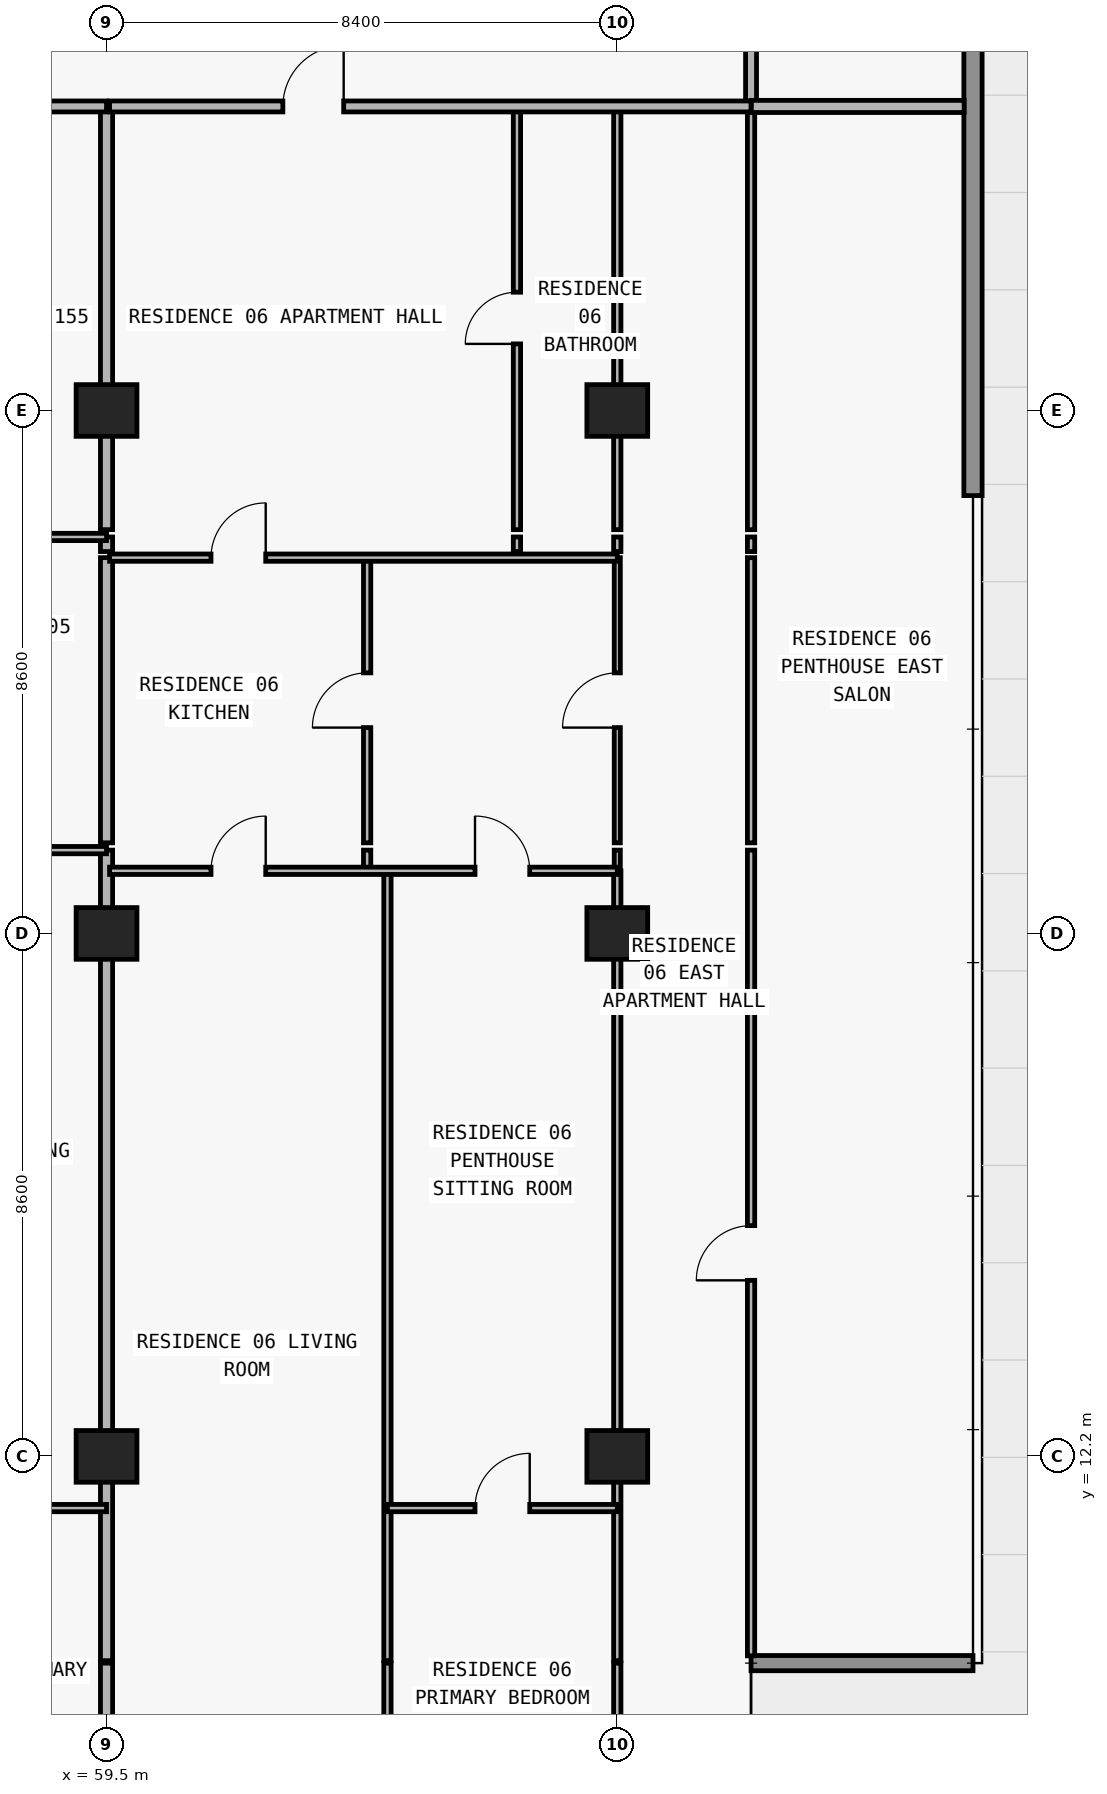
"""IFC4 building model, lengths in metres.
Left out: names, types, materials, properties, quantities, classifications, styles, units other than length and angle.
Written with IfcOpenShell. Run it as: python <this file> out.ifc"""

import sys

from ifc_helpers import new_model, si_unit, direction, frame, frame_2d, origin, origin_2d, place, context, subcontext, project, spatial, rectangle, extrude, element, fill, save


model = new_model("IFC4")
c1 = context("Model", 3, precision=1e-05, world=origin(), true_north=direction((0.0, 1.0)))
c2 = subcontext(c1, "Body", "Model", "MODEL_VIEW")
j1 = project(units=[si_unit("LENGTHUNIT", "METRE"), si_unit("PLANEANGLEUNIT", "RADIAN")], contexts=[c1])
p1 = place(None, origin())
s1 = spatial("IfcSite", under=j1, at=p1, CompositionType="ELEMENT")
p2 = place(p1, origin())
s2 = spatial("IfcBuilding", under=s1, at=p2, CompositionType="ELEMENT")
p3 = place(p2, frame((0.0, 0.0, 84.6)))
s3 = spatial("IfcBuildingStorey", under=s2, at=p3, CompositionType="ELEMENT", Elevation=84.6)
for number, where, z_axis, x_axis in (
    (1, (59.5, 12.2, 0.0), (0.0, 0.0, 1.0), (1.0, 0.0, 0.0)),
    (2, (67.9, 12.2, 0.0), (0.0, 0.0, 1.0), (1.0, 0.0, 0.0)),
    (3, (59.5, 20.8, 0.0), (0.0, 0.0, 1.0), (1.0, 0.0, 0.0)),
    (4, (67.9, 20.8, 0.0), (0.0, 0.0, 1.0), (1.0, 0.0, 0.0)),
    (5, (59.5, 29.4, 0.0), (0.0, 0.0, 1.0), (1.0, 0.0, 0.0)),
    (6, (67.9, 29.4, 0.0), (0.0, 0.0, 1.0), (1.0, 0.0, 0.0)),
):
    element("IfcColumn", number, at=place(p3, frame(where, z_axis=z_axis, x_axis=x_axis)), inside=s3, PredefinedType="COLUMN", context=c2, shape_type="SweptSolid", body=[
        extrude(rectangle(XDim=1.0, YDim=0.85, at=origin_2d()), origin(), (0.0, 0.0, 1.0), 3.05),
    ])
p4 = place(p3, frame((70.1, 8.8, 0.0), z_axis=(0.0, 0.0, 1.0), x_axis=(1.0, 0.0, 0.0)))
e7 = element("IfcWall", 7, at=p4, inside=s3, PredefinedType="ELEMENTEDWALL", context=c2, shape_type="SweptSolid", body=[
    extrude(rectangle(XDim=3.65, YDim=0.25, at=frame_2d((1.825, 0.0))), origin(), (0.0, 0.0, 1.0), 3.05),
])
p5 = place(p3, frame((73.75, 47.2, 0.0), z_axis=(0.0, 0.0, 1.0), x_axis=(0.0, -1.0, 0.0)))
e8 = element("IfcWall", 8, at=p5, inside=s3, PredefinedType="STANDARD", context=c2, shape_type="SweptSolid", body=[
    extrude(rectangle(XDim=19.2, YDim=0.3, at=frame_2d((9.6, 0.0))), origin(), (0.0, 0.0, 1.0), 3.05),
])
p6 = place(p3, frame((59.5, 5.695, 0.0), z_axis=(0.0, 0.0, 1.0), x_axis=(0.0, 1.0, 0.0)))
e9 = element("IfcWall", 9, at=p6, inside=s3, PredefinedType="PARTITIONING", context=c2, shape_type="SweptSolid", body=[
    extrude(rectangle(XDim=3.105, YDim=0.2, at=frame_2d((1.552, 0.0))), origin(), (0.0, 0.0, 1.0), 3.05),
])
p7 = place(p3, frame((59.5, 8.84, 0.0), z_axis=(0.0, 0.0, 1.0), x_axis=(0.0, 1.0, 0.0)))
e10 = element("IfcWall", 10, at=p7, inside=s3, PredefinedType="PARTITIONING", context=c2, shape_type="SweptSolid", body=[
    extrude(rectangle(XDim=13.33, YDim=0.2, at=frame_2d((6.665, 0.0))), origin(), (0.0, 0.0, 1.0), 2.174),
])
p8 = place(p3, frame((59.5, 22.29, 0.0), z_axis=(0.0, 0.0, 1.0), x_axis=(0.0, 1.0, 0.0)))
e11 = element("IfcWall", 11, at=p8, inside=s3, PredefinedType="PARTITIONING", context=c2, shape_type="SweptSolid", body=[
    extrude(rectangle(XDim=4.69, YDim=0.2, at=frame_2d((2.345, 0.0))), origin(), (0.0, 0.0, 1.0), 2.174),
])
p9 = place(p3, frame((59.5, 27.08, 0.0), z_axis=(0.0, 0.0, 1.0), x_axis=(0.0, 1.0, 0.0)))
e12 = element("IfcWall", 12, at=p9, inside=s3, PredefinedType="PARTITIONING", context=c2, shape_type="SweptSolid", body=[
    extrude(rectangle(XDim=0.24, YDim=0.2, at=frame_2d((0.12, 0.0))), origin(), (0.0, 0.0, 1.0), 2.174),
])
p10 = place(p3, frame((59.5, 27.44, 0.0), z_axis=(0.0, 0.0, 1.0), x_axis=(0.0, 1.0, 0.0)))
e13 = element("IfcWall", 13, at=p10, inside=s3, PredefinedType="PARTITIONING", context=c2, shape_type="SweptSolid", body=[
    extrude(rectangle(XDim=6.96, YDim=0.2, at=frame_2d((3.48, 0.0))), origin(), (0.0, 0.0, 1.0), 2.174),
])
p11 = place(p3, frame((63.786, 21.83, 0.0), z_axis=(0.0, 0.0, 1.0), x_axis=(0.0, 1.0, 0.0)))
e14 = element("IfcWall", 14, at=p11, inside=s3, PredefinedType="PARTITIONING", context=c2, shape_type="SweptSolid", body=[
    extrude(rectangle(XDim=0.34, YDim=0.12, at=frame_2d((0.17, 0.0))), origin(), (0.0, 0.0, 1.0), 3.05),
])
p12 = place(p3, frame((63.786, 22.29, 0.0), z_axis=(0.0, 0.0, 1.0), x_axis=(0.0, 1.0, 0.0)))
e15 = element("IfcWall", 15, at=p12, inside=s3, PredefinedType="PARTITIONING", context=c2, shape_type="SweptSolid", body=[
    extrude(rectangle(XDim=4.69, YDim=0.12, at=frame_2d((2.345, 0.0))), origin(), (0.0, 0.0, 1.0), 3.05),
])
p13 = place(p12, frame((1.895, 0.0, 0.0)))
e16 = element("IfcOpeningElement", 16, at=p13, cuts=e15, PredefinedType="OPENING", context=c2, shape_type="SweptSolid", body=[
    extrude(rectangle(XDim=0.9, YDim=2.15, at=frame_2d((0.45, 1.075))), frame((0.0, 0.07, 0.0), z_axis=(0.0, -1.0, 0.0), x_axis=(1.0, 0.0, 0.0)), (0.0, 0.0, 1.0), 0.14),
])
p14 = place(p3, frame((64.12, 5.695, 0.0), z_axis=(0.0, 0.0, 1.0), x_axis=(0.0, 1.0, 0.0)))
e17 = element("IfcWall", 17, at=p14, inside=s3, PredefinedType="PARTITIONING", context=c2, shape_type="SweptSolid", body=[
    extrude(rectangle(XDim=3.105, YDim=0.12, at=frame_2d((1.552, 0.0))), origin(), (0.0, 0.0, 1.0), 3.05),
])
p15 = place(p3, frame((64.12, 8.84, 0.0), z_axis=(0.0, 0.0, 1.0), x_axis=(0.0, 1.0, 0.0)))
e18 = element("IfcWall", 18, at=p15, inside=s3, PredefinedType="PARTITIONING", context=c2, shape_type="SweptSolid", body=[
    extrude(rectangle(XDim=12.99, YDim=0.12, at=frame_2d((6.495, 0.0))), origin(), (0.0, 0.0, 1.0), 3.05),
])
p16 = place(p3, frame((66.25, 27.08, 0.0), z_axis=(0.0, 0.0, 1.0), x_axis=(0.0, 1.0, 0.0)))
e19 = element("IfcWall", 19, at=p16, inside=s3, PredefinedType="PARTITIONING", context=c2, shape_type="SweptSolid", body=[
    extrude(rectangle(XDim=0.24, YDim=0.12, at=frame_2d((0.12, 0.0))), origin(), (0.0, 0.0, 1.0), 3.05),
])
p17 = place(p3, frame((66.25, 27.44, 0.0), z_axis=(0.0, 0.0, 1.0), x_axis=(0.0, 1.0, 0.0)))
e20 = element("IfcWall", 20, at=p17, inside=s3, PredefinedType="PARTITIONING", context=c2, shape_type="SweptSolid", body=[
    extrude(rectangle(XDim=6.96, YDim=0.12, at=frame_2d((3.48, 0.0))), origin(), (0.0, 0.0, 1.0), 3.05),
])
p18 = place(p17, frame((3.055, 0.0, 0.0)))
e21 = element("IfcOpeningElement", 21, at=p18, cuts=e20, PredefinedType="OPENING", context=c2, shape_type="SweptSolid", body=[
    extrude(rectangle(XDim=0.85, YDim=2.1, at=frame_2d((0.425, 1.05))), frame((0.0, 0.07, 0.0), z_axis=(0.0, -1.0, 0.0), x_axis=(1.0, 0.0, 0.0)), (0.0, 0.0, 1.0), 0.14),
])
p19 = place(p3, frame((67.9, 5.695, 0.0), z_axis=(0.0, 0.0, 1.0), x_axis=(0.0, 1.0, 0.0)))
e22 = element("IfcWall", 22, at=p19, inside=s3, PredefinedType="PARTITIONING", context=c2, shape_type="SweptSolid", body=[
    extrude(rectangle(XDim=3.105, YDim=0.12, at=frame_2d((1.552, 0.0))), origin(), (0.0, 0.0, 1.0), 3.05),
])
p20 = place(p3, frame((67.9, 8.84, 0.0), z_axis=(0.0, 0.0, 1.0), x_axis=(0.0, 1.0, 0.0)))
e23 = element("IfcWall", 23, at=p20, inside=s3, PredefinedType="PARTITIONING", context=c2, shape_type="SweptSolid", body=[
    extrude(rectangle(XDim=12.99, YDim=0.12, at=frame_2d((6.495, 0.0))), origin(), (0.0, 0.0, 1.0), 2.174),
])
p21 = place(p3, frame((67.9, 21.835, 0.0), z_axis=(0.0, 0.0, 1.0), x_axis=(0.0, 1.0, 0.0)))
e24 = element("IfcWall", 24, at=p21, inside=s3, PredefinedType="MOVABLE", context=c2, shape_type="SweptSolid", body=[
    extrude(rectangle(XDim=0.335, YDim=0.1, at=frame_2d((0.167, 0.0))), origin(), (0.0, 0.0, 1.0), 2.174),
])
p22 = place(p3, frame((67.9, 22.29, 0.0), z_axis=(0.0, 0.0, 1.0), x_axis=(0.0, 1.0, 0.0)))
e25 = element("IfcWall", 25, at=p22, inside=s3, PredefinedType="MOVABLE", context=c2, shape_type="SweptSolid", body=[
    extrude(rectangle(XDim=4.69, YDim=0.1, at=frame_2d((2.345, 0.0))), origin(), (0.0, 0.0, 1.0), 2.174),
])
p23 = place(p22, frame((1.895, 0.0, 0.0)))
e26 = element("IfcOpeningElement", 26, at=p23, cuts=e25, PredefinedType="OPENING", context=c2, shape_type="SweptSolid", body=[
    extrude(rectangle(XDim=0.9, YDim=2.124, at=frame_2d((0.45, 1.062))), frame((0.0, 0.06, 0.0), z_axis=(0.0, -1.0, 0.0), x_axis=(1.0, 0.0, 0.0)), (0.0, 0.0, 1.0), 0.12),
])
p24 = place(p3, frame((67.9, 27.08, 0.0), z_axis=(0.0, 0.0, 1.0), x_axis=(0.0, 1.0, 0.0)))
e27 = element("IfcWall", 27, at=p24, inside=s3, PredefinedType="PARTITIONING", context=c2, shape_type="SweptSolid", body=[
    extrude(rectangle(XDim=0.24, YDim=0.12, at=frame_2d((0.12, 0.0))), origin(), (0.0, 0.0, 1.0), 2.174),
])
p25 = place(p3, frame((67.9, 27.44, 0.0), z_axis=(0.0, 0.0, 1.0), x_axis=(0.0, 1.0, 0.0)))
e28 = element("IfcWall", 28, at=p25, inside=s3, PredefinedType="PARTITIONING", context=c2, shape_type="SweptSolid", body=[
    extrude(rectangle(XDim=6.96, YDim=0.12, at=frame_2d((3.48, 0.0))), origin(), (0.0, 0.0, 1.0), 2.174),
])
p26 = place(p3, frame((70.1, 8.92, 0.0), z_axis=(0.0, 0.0, 1.0), x_axis=(0.0, 1.0, 0.0)))
e29 = element("IfcWall", 29, at=p26, inside=s3, PredefinedType="PARTITIONING", context=c2, shape_type="SweptSolid", body=[
    extrude(rectangle(XDim=13.25, YDim=0.12, at=frame_2d((6.625, 0.0))), origin(), (0.0, 0.0, 1.0), 3.05),
])
p27 = place(p26, frame((6.175, 0.0, 0.0)))
e30 = element("IfcOpeningElement", 30, at=p27, cuts=e29, PredefinedType="OPENING", context=c2, shape_type="SweptSolid", body=[
    extrude(rectangle(XDim=0.9, YDim=2.15, at=frame_2d((0.45, 1.075))), frame((0.0, 0.07, 0.0), z_axis=(0.0, -1.0, 0.0), x_axis=(1.0, 0.0, 0.0)), (0.0, 0.0, 1.0), 0.14),
])
p28 = place(p3, frame((70.1, 22.29, 0.0), z_axis=(0.0, 0.0, 1.0), x_axis=(0.0, 1.0, 0.0)))
e31 = element("IfcWall", 31, at=p28, inside=s3, PredefinedType="PARTITIONING", context=c2, shape_type="SweptSolid", body=[
    extrude(rectangle(XDim=4.69, YDim=0.12, at=frame_2d((2.345, 0.0))), origin(), (0.0, 0.0, 1.0), 3.05),
])
p29 = place(p3, frame((70.1, 27.08, 0.0), z_axis=(0.0, 0.0, 1.0), x_axis=(0.0, 1.0, 0.0)))
e32 = element("IfcWall", 32, at=p29, inside=s3, PredefinedType="PARTITIONING", context=c2, shape_type="SweptSolid", body=[
    extrude(rectangle(XDim=0.24, YDim=0.12, at=frame_2d((0.12, 0.0))), origin(), (0.0, 0.0, 1.0), 3.05),
])
p30 = place(p3, frame((70.1, 27.44, 0.0), z_axis=(0.0, 0.0, 1.0), x_axis=(0.0, 1.0, 0.0)))
e33 = element("IfcWall", 33, at=p30, inside=s3, PredefinedType="PARTITIONING", context=c2, shape_type="SweptSolid", body=[
    extrude(rectangle(XDim=6.96, YDim=0.12, at=frame_2d((3.48, 0.0))), origin(), (0.0, 0.0, 1.0), 3.05),
])
p31 = place(p3, frame((70.1, 34.405, 0.0), z_axis=(0.0, 0.0, 1.0), x_axis=(0.0, 1.0, 0.0)))
e34 = element("IfcWall", 34, at=p31, inside=s3, PredefinedType="PARTITIONING", context=c2, shape_type="SweptSolid", body=[
    extrude(rectangle(XDim=2.545, YDim=0.18, at=frame_2d((1.272, 0.0))), origin(), (0.0, 0.0, 1.0), 3.05),
])
p32 = place(p3, frame((55.9, 11.35, 0.0), z_axis=(0.0, 0.0, 1.0), x_axis=(1.0, 0.0, 0.0)))
e35 = element("IfcWall", 35, at=p32, inside=s3, PredefinedType="PARTITIONING", context=c2, shape_type="SweptSolid", body=[
    extrude(rectangle(XDim=3.6, YDim=0.12, at=frame_2d((1.8, 0.0))), origin(), (0.0, 0.0, 1.0), 3.05),
])
p33 = place(p32, frame((1.35, 0.0, 0.0)))
e36 = element("IfcOpeningElement", 36, at=p33, cuts=e35, PredefinedType="OPENING", context=c2, shape_type="SweptSolid", body=[
    extrude(rectangle(XDim=0.9, YDim=2.15, at=frame_2d((0.45, 1.075))), frame((0.0, 0.07, 0.0), z_axis=(0.0, -1.0, 0.0), x_axis=(1.0, 0.0, 0.0)), (0.0, 0.0, 1.0), 0.14),
])
p34 = place(p3, frame((64.12, 11.35, 0.0), z_axis=(0.0, 0.0, 1.0), x_axis=(1.0, 0.0, 0.0)))
e37 = element("IfcWall", 37, at=p34, inside=s3, PredefinedType="PARTITIONING", context=c2, shape_type="SweptSolid", body=[
    extrude(rectangle(XDim=3.78, YDim=0.12, at=frame_2d((1.89, 0.0))), origin(), (0.0, 0.0, 1.0), 3.05),
])
p35 = place(p34, frame((1.44, 0.0, 0.0)))
e38 = element("IfcOpeningElement", 38, at=p35, cuts=e37, PredefinedType="OPENING", context=c2, shape_type="SweptSolid", body=[
    extrude(rectangle(XDim=0.9, YDim=2.15, at=frame_2d((0.45, 1.075))), frame((0.0, 0.07, 0.0), z_axis=(0.0, -1.0, 0.0), x_axis=(1.0, 0.0, 0.0)), (0.0, 0.0, 1.0), 0.14),
])
p36 = place(p3, frame((59.55, 21.83, 0.0), z_axis=(0.0, 0.0, 1.0), x_axis=(1.0, 0.0, 0.0)))
e39 = element("IfcWall", 39, at=p36, inside=s3, PredefinedType="PARTITIONING", context=c2, shape_type="SweptSolid", body=[
    extrude(rectangle(XDim=8.35, YDim=0.12, at=frame_2d((4.175, 0.0))), origin(), (0.0, 0.0, 1.0), 3.05),
])
p37 = place(p36, frame((1.668, 0.0, 0.0)))
e40 = element("IfcOpeningElement", 40, at=p37, cuts=e39, PredefinedType="OPENING", context=c2, shape_type="SweptSolid", body=[
    extrude(rectangle(XDim=0.9, YDim=2.15, at=frame_2d((0.45, 1.075))), frame((0.0, 0.07, 0.0), z_axis=(0.0, -1.0, 0.0), x_axis=(1.0, 0.0, 0.0)), (0.0, 0.0, 1.0), 0.14),
])
p38 = place(p36, frame((6.01, 0.0, 0.0)))
e41 = element("IfcOpeningElement", 41, at=p38, cuts=e39, PredefinedType="OPENING", context=c2, shape_type="SweptSolid", body=[
    extrude(rectangle(XDim=0.9, YDim=2.15, at=frame_2d((0.45, 1.075))), frame((0.0, 0.07, 0.0), z_axis=(0.0, -1.0, 0.0), x_axis=(1.0, 0.0, 0.0)), (0.0, 0.0, 1.0), 0.14),
])
p39 = place(p3, frame((55.9, 22.17, 0.0), z_axis=(0.0, 0.0, 1.0), x_axis=(1.0, 0.0, 0.0)))
e42 = element("IfcWall", 42, at=p39, inside=s3, PredefinedType="PARTITIONING", context=c2, shape_type="SweptSolid", body=[
    extrude(rectangle(XDim=3.6, YDim=0.12, at=frame_2d((1.8, 0.0))), origin(), (0.0, 0.0, 1.0), 3.05),
])
p40 = place(p39, frame((1.35, 0.0, 0.0)))
e43 = element("IfcOpeningElement", 43, at=p40, cuts=e42, PredefinedType="OPENING", context=c2, shape_type="SweptSolid", body=[
    extrude(rectangle(XDim=0.9, YDim=2.15, at=frame_2d((0.45, 1.075))), frame((0.0, 0.07, 0.0), z_axis=(0.0, -1.0, 0.0), x_axis=(1.0, 0.0, 0.0)), (0.0, 0.0, 1.0), 0.14),
])
p41 = place(p3, frame((59.55, 26.98, 0.0), z_axis=(0.0, 0.0, 1.0), x_axis=(1.0, 0.0, 0.0)))
e44 = element("IfcWall", 44, at=p41, inside=s3, PredefinedType="PARTITIONING", context=c2, shape_type="SweptSolid", body=[
    extrude(rectangle(XDim=8.35, YDim=0.12, at=frame_2d((4.175, 0.0))), origin(), (0.0, 0.0, 1.0), 3.05),
])
p42 = place(p41, frame((1.668, 0.0, 0.0)))
e45 = element("IfcOpeningElement", 45, at=p42, cuts=e44, PredefinedType="OPENING", context=c2, shape_type="SweptSolid", body=[
    extrude(rectangle(XDim=0.9, YDim=2.15, at=frame_2d((0.45, 1.075))), frame((0.0, 0.07, 0.0), z_axis=(0.0, -1.0, 0.0), x_axis=(1.0, 0.0, 0.0)), (0.0, 0.0, 1.0), 0.14),
])
p43 = place(p3, frame((55.9, 27.32, 0.0), z_axis=(0.0, 0.0, 1.0), x_axis=(1.0, 0.0, 0.0)))
e46 = element("IfcWall", 46, at=p43, inside=s3, PredefinedType="PARTITIONING", context=c2, shape_type="SweptSolid", body=[
    extrude(rectangle(XDim=3.6, YDim=0.12, at=frame_2d((1.8, 0.0))), origin(), (0.0, 0.0, 1.0), 3.05),
])
p44 = place(p3, frame((55.9, 34.4, 0.0), z_axis=(0.0, 0.0, 1.0), x_axis=(1.0, 0.0, 0.0)))
e47 = element("IfcWall", 47, at=p44, inside=s3, PredefinedType="PARTITIONING", context=c2, shape_type="SweptSolid", body=[
    extrude(rectangle(XDim=3.6, YDim=0.18, at=frame_2d((1.8, 0.0))), origin(), (0.0, 0.0, 1.0), 3.05),
])
p45 = place(p3, frame((59.55, 34.4, 0.0), z_axis=(0.0, 0.0, 1.0), x_axis=(1.0, 0.0, 0.0)))
e48 = element("IfcWall", 48, at=p45, inside=s3, PredefinedType="PARTITIONING", context=c2, shape_type="SweptSolid", body=[
    extrude(rectangle(XDim=10.55, YDim=0.18, at=frame_2d((5.275, 0.0))), origin(), (0.0, 0.0, 1.0), 3.05),
])
p46 = place(p45, frame((2.85, 0.0, 0.0)))
e49 = element("IfcOpeningElement", 49, at=p46, cuts=e48, PredefinedType="OPENING", context=c2, shape_type="SweptSolid", body=[
    extrude(rectangle(XDim=1.0, YDim=2.2, at=frame_2d((0.5, 1.1))), frame((0.0, 0.1, 0.0), z_axis=(0.0, -1.0, 0.0), x_axis=(1.0, 0.0, 0.0)), (0.0, 0.0, 1.0), 0.2),
])
p47 = place(p3, frame((70.105, 34.4, 0.0), z_axis=(0.0, 0.0, 1.0), x_axis=(1.0, 0.0, 0.0)))
e50 = element("IfcWall", 50, at=p47, inside=s3, PredefinedType="PARTITIONING", context=c2, shape_type="SweptSolid", body=[
    extrude(rectangle(XDim=3.5, YDim=0.2, at=frame_2d((1.75, 0.0))), origin(), (0.0, 0.0, 1.0), 3.05),
])
p48 = place(p46, origin())
e51 = element("IfcDoor", 51, at=p48, inside=s3, OperationType="SINGLE_SWING_RIGHT", PredefinedType="DOOR", context=c2, shape_type="SweptSolid", body=[
    extrude(rectangle(XDim=1.0, YDim=2.2, at=frame_2d((0.5, 1.1))), frame((0.0, 0.025, 0.0), z_axis=(0.0, -1.0, 0.0), x_axis=(1.0, 0.0, 0.0)), (0.0, 0.0, 1.0), 0.05),
])
fill(e49, e51)
p49 = place(p18, origin())
e52 = element("IfcDoor", 52, at=p49, inside=s3, OperationType="SINGLE_SWING_LEFT", PredefinedType="DOOR", context=c2, shape_type="SweptSolid", body=[
    extrude(rectangle(XDim=0.85, YDim=2.1, at=frame_2d((0.425, 1.05))), frame((0.0, 0.025, 0.0), z_axis=(0.0, -1.0, 0.0), x_axis=(1.0, 0.0, 0.0)), (0.0, 0.0, 1.0), 0.05),
])
fill(e21, e52)
p50 = place(p42, origin())
e53 = element("IfcDoor", 53, at=p50, inside=s3, OperationType="SINGLE_SWING_RIGHT", PredefinedType="DOOR", context=c2, shape_type="SweptSolid", body=[
    extrude(rectangle(XDim=0.9, YDim=2.15, at=frame_2d((0.45, 1.075))), frame((0.0, 0.025, 0.0), z_axis=(0.0, -1.0, 0.0), x_axis=(1.0, 0.0, 0.0)), (0.0, 0.0, 1.0), 0.05),
])
fill(e45, e53)
p51 = place(p13, origin())
e54 = element("IfcDoor", 54, at=p51, inside=s3, OperationType="SINGLE_SWING_LEFT", PredefinedType="DOOR", context=c2, shape_type="SweptSolid", body=[
    extrude(rectangle(XDim=0.9, YDim=2.15, at=frame_2d((0.45, 1.075))), frame((0.0, 0.025, 0.0), z_axis=(0.0, -1.0, 0.0), x_axis=(1.0, 0.0, 0.0)), (0.0, 0.0, 1.0), 0.05),
])
fill(e16, e54)
p52 = place(p37, origin())
e55 = element("IfcDoor", 55, at=p52, inside=s3, OperationType="SINGLE_SWING_RIGHT", PredefinedType="DOOR", context=c2, shape_type="SweptSolid", body=[
    extrude(rectangle(XDim=0.9, YDim=2.15, at=frame_2d((0.45, 1.075))), frame((0.0, 0.025, 0.0), z_axis=(0.0, -1.0, 0.0), x_axis=(1.0, 0.0, 0.0)), (0.0, 0.0, 1.0), 0.05),
])
fill(e40, e55)
p53 = place(p38, origin())
e56 = element("IfcDoor", 56, at=p53, inside=s3, OperationType="SINGLE_SWING_LEFT", PredefinedType="DOOR", context=c2, shape_type="SweptSolid", body=[
    extrude(rectangle(XDim=0.9, YDim=2.15, at=frame_2d((0.45, 1.075))), frame((0.0, 0.025, 0.0), z_axis=(0.0, -1.0, 0.0), x_axis=(1.0, 0.0, 0.0)), (0.0, 0.0, 1.0), 0.05),
])
fill(e41, e56)
p54 = place(p35, origin())
e57 = element("IfcDoor", 57, at=p54, inside=s3, OperationType="SINGLE_SWING_RIGHT", PredefinedType="DOOR", context=c2, shape_type="SweptSolid", body=[
    extrude(rectangle(XDim=0.9, YDim=2.15, at=frame_2d((0.45, 1.075))), frame((0.0, 0.025, 0.0), z_axis=(0.0, -1.0, 0.0), x_axis=(1.0, 0.0, 0.0)), (0.0, 0.0, 1.0), 0.05),
])
fill(e38, e57)
p55 = place(p23, origin())
e58 = element("IfcDoor", 58, at=p55, inside=s3, OperationType="SINGLE_SWING_LEFT", PredefinedType="DOOR", context=c2, shape_type="SweptSolid", body=[
    extrude(rectangle(XDim=0.9, YDim=2.124, at=frame_2d((0.45, 1.062))), frame((0.0, 0.025, 0.0), z_axis=(0.0, -1.0, 0.0), x_axis=(1.0, 0.0, 0.0)), (0.0, 0.0, 1.0), 0.05),
])
fill(e26, e58)
p56 = place(p27, origin())
e59 = element("IfcDoor", 59, at=p56, inside=s3, OperationType="SINGLE_SWING_LEFT", PredefinedType="DOOR", context=c2, shape_type="SweptSolid", body=[
    extrude(rectangle(XDim=0.9, YDim=2.15, at=frame_2d((0.45, 1.075))), frame((0.0, 0.025, 0.0), z_axis=(0.0, -1.0, 0.0), x_axis=(1.0, 0.0, 0.0)), (0.0, 0.0, 1.0), 0.05),
])
fill(e30, e59)
save(model, sys.argv[1])
